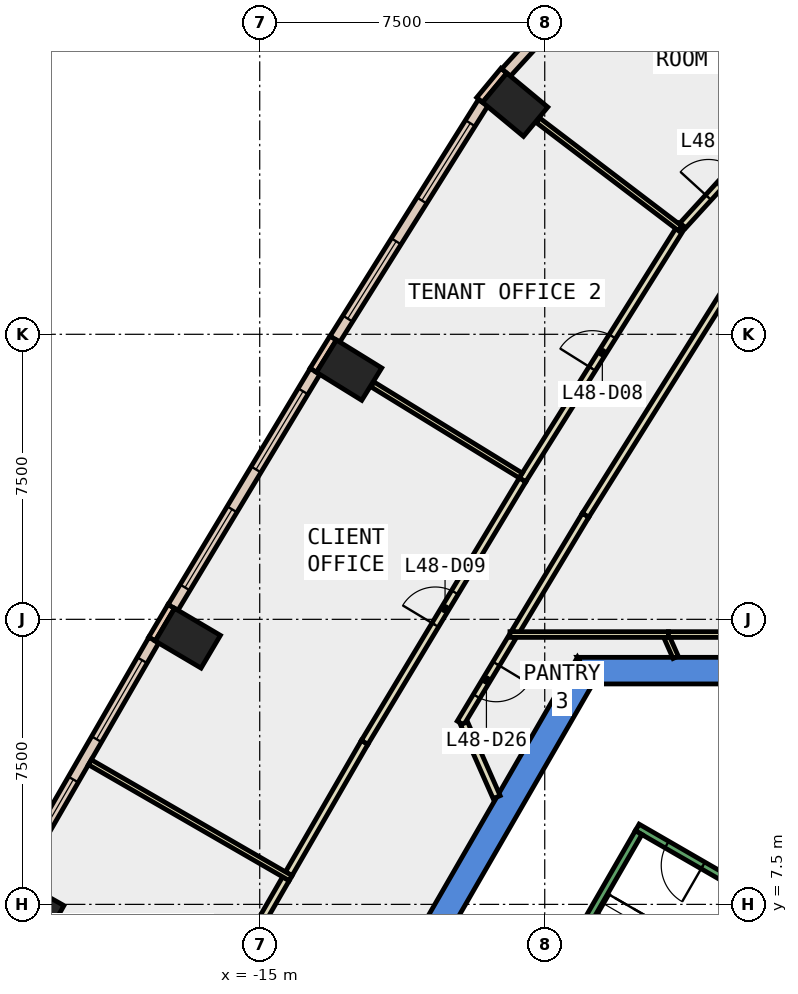
"""IFC4 building model, lengths in metres.
Left out: names, types, materials, properties, quantities, classifications, styles, units other than length and angle.
Written with IfcOpenShell. Run it as: python <this file> out.ifc"""

import sys

from ifc_helpers import new_model, si_unit, direction, frame, frame_2d, origin, origin_2d, place, context, subcontext, project, spatial, polyline, rectangle, outline, extrude, element, fill, save


model = new_model("IFC4")
c1 = context("Model", 3, precision=1e-05, world=origin(), true_north=direction((0.0, 1.0)))
c2 = subcontext(c1, "Body", "Model", "MODEL_VIEW")
j1 = project(units=[si_unit("LENGTHUNIT", "METRE"), si_unit("PLANEANGLEUNIT", "RADIAN")], contexts=[c1])
p1 = place(None, origin())
s1 = spatial("IfcSite", under=j1, at=p1, CompositionType="ELEMENT")
p2 = place(p1, origin())
s2 = spatial("IfcBuilding", under=s1, at=p2, CompositionType="ELEMENT")
p3 = place(p2, frame((0.0, 0.0, 215.0)))
s3 = spatial("IfcBuildingStorey", under=s2, at=p3, CompositionType="ELEMENT", Elevation=215.0)
for number, where, z_axis, x_axis in (
    (1, (-8.278, 28.54, -0.4), (0.0, 0.0, 1.0), (0.639, 0.769, 0.0)),
    (2, (-12.648, 21.557, -0.4), (0.0, 0.0, 1.0), (0.525, 0.851, 0.0)),
    (3, (-16.892, 14.504, -0.4), (0.0, 0.0, 1.0), (0.509, 0.861, 0.0)),
    (4, (-21.007, 7.377, -0.4), (0.0, 0.0, 1.0), (0.491, 0.871, 0.0)),
):
    element("IfcColumn", number, at=place(p3, frame(where, z_axis=z_axis, x_axis=x_axis)), inside=s3, PredefinedType="COLUMN", context=c2, shape_type="SweptSolid", body=[
        extrude(rectangle(XDim=1.0, YDim=1.4, at=origin_2d()), origin(), (0.0, 0.0, 1.0), 4.2),
    ])
p4 = place(p3, frame((0.0, 0.0, -0.4)))
e5 = element("IfcWall", 5, at=p4, inside=s3, PredefinedType="SHEAR", context=c2, shape_type="SweptSolid", body=[
    extrude(outline(polyline([(6.64, 14.0), (-6.64, 14.0), (-6.235, 13.3), (6.235, 13.3), (6.64, 14.0)])), origin(), (0.0, 0.0, 1.0), 4.2),
])
p5 = place(p3, frame((0.0, 0.0, -0.4)))
e6 = element("IfcWall", 6, at=p5, inside=s3, PredefinedType="SHEAR", context=c2, shape_type="SweptSolid", body=[
    extrude(outline(polyline([(-11.834, 5.002), (-11.228, 4.652), (-6.235, 13.3), (-6.64, 14.0), (-11.834, 5.002)])), origin(), (0.0, 0.0, 1.0), 4.2),
])
p6 = place(p3, frame((-8.575, 29.436, 0.0), z_axis=(0.0, 0.0, 1.0), x_axis=(-0.637972365578, -0.770059257953, 0.0)))
e7 = element("IfcWall", 7, at=p6, inside=s3, PredefinedType="STANDARD", context=c2, shape_type="SweptSolid", body=[
    extrude(rectangle(XDim=1.0, YDim=0.2, at=frame_2d((0.5, 0.0))), origin(), (0.0, 0.0, 1.0), 3.8),
])
p7 = place(p3, frame((-13.066, 22.403, 0.0), z_axis=(0.0, 0.0, 1.0), x_axis=(-0.525825307325, -0.850592585306, 0.0)))
e8 = element("IfcWall", 8, at=p7, inside=s3, PredefinedType="STANDARD", context=c2, shape_type="SweptSolid", body=[
    extrude(rectangle(XDim=1.0, YDim=0.2, at=frame_2d((0.5, 0.0))), origin(), (0.0, 0.0, 1.0), 3.8),
])
p8 = place(p3, frame((-17.327, 15.342, 0.0), z_axis=(0.0, 0.0, 1.0), x_axis=(-0.508161541526, -0.861261776531, 0.0)))
e9 = element("IfcWall", 9, at=p8, inside=s3, PredefinedType="STANDARD", context=c2, shape_type="SweptSolid", body=[
    extrude(rectangle(XDim=1.0, YDim=0.2, at=frame_2d((0.5, 0.0))), origin(), (0.0, 0.0, 1.0), 3.8),
])
p9 = place(p3, frame((-5.653, 32.524, 0.0), z_axis=(0.0, 0.0, 1.0), x_axis=(-0.674487390017, -0.738286367684, 0.0)))
e10 = element("IfcWall", 10, at=p9, inside=s3, PredefinedType="STANDARD", context=c2, shape_type="SweptSolid", body=[
    extrude(rectangle(XDim=4.248, YDim=0.3, at=frame_2d((2.124, 0.0))), origin(), (0.0, 0.0, 1.0), 3.8),
])
p10 = place(p9, frame((1.424, 0.0, 0.9)))
e11 = element("IfcOpeningElement", 11, at=p10, cuts=e10, PredefinedType="OPENING", context=c2, shape_type="SweptSolid", body=[
    extrude(rectangle(XDim=1.4, YDim=2.6, at=frame_2d((0.7, 1.3))), frame((0.0, 0.16, 0.0), z_axis=(0.0, -1.0, 0.0), x_axis=(1.0, 0.0, 0.0)), (0.0, 0.0, 1.0), 0.32),
])
p11 = place(p3, frame((-9.122, 28.592, 0.0), z_axis=(0.0, 0.0, 1.0), x_axis=(-0.531239262679, -0.847221839773, 0.0)))
e12 = element("IfcWall", 12, at=p11, inside=s3, PredefinedType="STANDARD", context=c2, shape_type="SweptSolid", body=[
    extrude(rectangle(XDim=7.339, YDim=0.3, at=frame_2d((3.67, 0.0))), origin(), (0.0, 0.0, 1.0), 3.8),
])
p12 = place(p11, frame((0.635, 0.0, 0.9)))
e13 = element("IfcOpeningElement", 13, at=p12, cuts=e12, PredefinedType="OPENING", context=c2, shape_type="SweptSolid", body=[
    extrude(rectangle(XDim=2.4, YDim=2.6, at=frame_2d((1.2, 1.3))), frame((0.0, 0.16, 0.0), z_axis=(0.0, -1.0, 0.0), x_axis=(1.0, 0.0, 0.0)), (0.0, 0.0, 1.0), 0.32),
])
p13 = place(p11, frame((4.304, 0.0, 0.9)))
e14 = element("IfcOpeningElement", 14, at=p13, cuts=e12, PredefinedType="OPENING", context=c2, shape_type="SweptSolid", body=[
    extrude(rectangle(XDim=2.4, YDim=2.6, at=frame_2d((1.2, 1.3))), frame((0.0, 0.16, 0.0), z_axis=(0.0, -1.0, 0.0), x_axis=(1.0, 0.0, 0.0)), (0.0, 0.0, 1.0), 0.32),
])
p14 = place(p3, frame((-13.544, 21.524, 0.0), z_axis=(0.0, 0.0, 1.0), x_axis=(-0.515560283412, -0.856853309597, 0.0)))
e15 = element("IfcWall", 15, at=p14, inside=s3, PredefinedType="STANDARD", context=c2, shape_type="SweptSolid", body=[
    extrude(rectangle(XDim=7.249, YDim=0.3, at=frame_2d((3.624, 0.0))), origin(), (0.0, 0.0, 1.0), 3.8),
])
p15 = place(p14, frame((0.612, 0.0, 0.9)))
e16 = element("IfcOpeningElement", 16, at=p15, cuts=e15, PredefinedType="OPENING", context=c2, shape_type="SweptSolid", body=[
    extrude(rectangle(XDim=2.4, YDim=2.6, at=frame_2d((1.2, 1.3))), frame((0.0, 0.16, 0.0), z_axis=(0.0, -1.0, 0.0), x_axis=(1.0, 0.0, 0.0)), (0.0, 0.0, 1.0), 0.32),
])
p16 = place(p14, frame((4.236, 0.0, 0.9)))
e17 = element("IfcOpeningElement", 17, at=p16, cuts=e15, PredefinedType="OPENING", context=c2, shape_type="SweptSolid", body=[
    extrude(rectangle(XDim=2.4, YDim=2.6, at=frame_2d((1.2, 1.3))), frame((0.0, 0.16, 0.0), z_axis=(0.0, -1.0, 0.0), x_axis=(1.0, 0.0, 0.0)), (0.0, 0.0, 1.0), 0.32),
])
p17 = place(p3, frame((-17.787, 14.454, 0.0), z_axis=(0.0, 0.0, 1.0), x_axis=(-0.499968351115, -0.866043675505, 0.0)))
e18 = element("IfcWall", 18, at=p17, inside=s3, PredefinedType="STANDARD", context=c2, shape_type="SweptSolid", body=[
    extrude(rectangle(XDim=7.248, YDim=0.3, at=frame_2d((3.624, 0.0))), origin(), (0.0, 0.0, 1.0), 3.8),
])
p18 = place(p17, frame((0.612, 0.0, 0.9)))
e19 = element("IfcOpeningElement", 19, at=p18, cuts=e18, PredefinedType="OPENING", context=c2, shape_type="SweptSolid", body=[
    extrude(rectangle(XDim=2.4, YDim=2.6, at=frame_2d((1.2, 1.3))), frame((0.0, 0.16, 0.0), z_axis=(0.0, -1.0, 0.0), x_axis=(1.0, 0.0, 0.0)), (0.0, 0.0, 1.0), 0.32),
])
p19 = place(p17, frame((4.236, 0.0, 0.9)))
e20 = element("IfcOpeningElement", 20, at=p19, cuts=e18, PredefinedType="OPENING", context=c2, shape_type="SweptSolid", body=[
    extrude(rectangle(XDim=2.4, YDim=2.6, at=frame_2d((1.2, 1.3))), frame((0.0, 0.16, 0.0), z_axis=(0.0, -1.0, 0.0), x_axis=(1.0, 0.0, 0.0)), (0.0, 0.0, 1.0), 0.32),
])
p20 = place(p3, frame((-8.353, 14.536, 0.0), z_axis=(0.0, 0.0, 1.0), x_axis=(-0.515636196259, -0.856807628997, 0.0)))
e21 = element("IfcWall", 21, at=p20, inside=s3, PredefinedType="PARTITIONING", context=c2, shape_type="SweptSolid", body=[
    extrude(rectangle(XDim=2.643, YDim=0.2, at=frame_2d((1.322, 0.0))), origin(), (0.0, 0.0, 1.0), 3.8),
])
p21 = place(p20, frame((0.822, 0.0, 0.0)))
e22 = element("IfcOpeningElement", 22, at=p21, cuts=e21, PredefinedType="OPENING", context=c2, shape_type="SweptSolid", body=[
    extrude(rectangle(XDim=1.0, YDim=2.1, at=frame_2d((0.5, 1.05))), frame((0.0, 0.11, 0.0), z_axis=(0.0, -1.0, 0.0), x_axis=(1.0, 0.0, 0.0)), (0.0, 0.0, 1.0), 0.22),
])
p22 = place(p3, frame((-9.624, 12.265, 0.0), z_axis=(0.0, 0.0, 1.0), x_axis=(0.404081180606, -0.914723127225, 0.0)))
e23 = element("IfcWall", 23, at=p22, inside=s3, PredefinedType="PARTITIONING", context=c2, shape_type="SweptSolid", body=[
    extrude(rectangle(XDim=2.126, YDim=0.2, at=frame_2d((1.063, 0.0))), origin(), (0.0, 0.0, 1.0), 3.8),
])
p23 = place(p3, frame((-2.364, 24.216, 0.0), z_axis=(0.0, 0.0, 1.0), x_axis=(-0.531335643981, -0.847161397512, 0.0)))
e24 = element("IfcWall", 24, at=p23, inside=s3, PredefinedType="PARTITIONING", context=c2, shape_type="SweptSolid", body=[
    extrude(rectangle(XDim=7.647, YDim=0.2, at=frame_2d((3.823, 0.0))), origin(), (0.0, 0.0, 1.0), 3.8),
])
p24 = place(p3, frame((-6.427, 17.738, 0.0), z_axis=(0.0, 0.0, 1.0), x_axis=(-0.515416266777, -0.85693994652, 0.0)))
e25 = element("IfcWall", 25, at=p24, inside=s3, PredefinedType="PARTITIONING", context=c2, shape_type="SweptSolid", body=[
    extrude(rectangle(XDim=3.587, YDim=0.2, at=frame_2d((1.793, 0.0))), origin(), (0.0, 0.0, 1.0), 3.8),
])
p25 = place(p3, frame((-3.869, 25.36, 0.0), z_axis=(0.0, 0.0, 1.0), x_axis=(0.674594755709, 0.738188265668, 0.0)))
e26 = element("IfcWall", 26, at=p25, inside=s3, PredefinedType="PARTITIONING", context=c2, shape_type="SweptSolid", body=[
    extrude(rectangle(XDim=3.006, YDim=0.2, at=frame_2d((1.503, 0.0))), origin(), (0.0, 0.0, 1.0), 3.8),
])
p26 = place(p25, frame((1.003, 0.0, 0.0)))
e27 = element("IfcOpeningElement", 27, at=p26, cuts=e26, PredefinedType="OPENING", context=c2, shape_type="SweptSolid", body=[
    extrude(rectangle(XDim=1.0, YDim=2.1, at=frame_2d((0.5, 1.05))), frame((0.0, 0.11, 0.0), z_axis=(0.0, -1.0, 0.0), x_axis=(1.0, 0.0, 0.0)), (0.0, 0.0, 1.0), 0.22),
])
p27 = place(p3, frame((-8.086, 18.669, 0.0), z_axis=(0.0, 0.0, 1.0), x_axis=(0.531329962263, 0.847164961033, 0.0)))
e28 = element("IfcWall", 28, at=p27, inside=s3, PredefinedType="PARTITIONING", context=c2, shape_type="SweptSolid", body=[
    extrude(rectangle(XDim=7.91, YDim=0.2, at=frame_2d((3.955, 0.0))), origin(), (0.0, 0.0, 1.0), 3.8),
])
p28 = place(p27, frame((3.455, 0.0, 0.0)))
e29 = element("IfcOpeningElement", 29, at=p28, cuts=e28, PredefinedType="OPENING", context=c2, shape_type="SweptSolid", body=[
    extrude(rectangle(XDim=1.0, YDim=2.1, at=frame_2d((0.5, 1.05))), frame((0.0, 0.11, 0.0), z_axis=(0.0, -1.0, 0.0), x_axis=(1.0, 0.0, 0.0)), (0.0, 0.0, 1.0), 0.22),
])
p29 = place(p3, frame((-14.236, 8.305, 0.0), z_axis=(0.0, 0.0, 1.0), x_axis=(0.500110539333, 0.865961574464, 0.0)))
e30 = element("IfcWall", 30, at=p29, inside=s3, PredefinedType="PARTITIONING", context=c2, shape_type="SweptSolid", body=[
    extrude(rectangle(XDim=3.993, YDim=0.2, at=frame_2d((1.997, 0.0))), origin(), (0.0, 0.0, 1.0), 3.8),
])
p30 = place(p3, frame((-12.239, 11.763, 0.0), z_axis=(0.0, 0.0, 1.0), x_axis=(0.515591302858, 0.856834644734, 0.0)))
e31 = element("IfcWall", 31, at=p30, inside=s3, PredefinedType="PARTITIONING", context=c2, shape_type="SweptSolid", body=[
    extrude(rectangle(XDim=8.059, YDim=0.2, at=frame_2d((4.029, 0.0))), origin(), (0.0, 0.0, 1.0), 3.8),
])
p31 = place(p30, frame((3.604, 0.0, 0.0)))
e32 = element("IfcOpeningElement", 32, at=p31, cuts=e31, PredefinedType="OPENING", context=c2, shape_type="SweptSolid", body=[
    extrude(rectangle(XDim=1.0, YDim=2.1, at=frame_2d((0.5, 1.05))), frame((0.0, 0.11, 0.0), z_axis=(0.0, -1.0, 0.0), x_axis=(1.0, 0.0, 0.0)), (0.0, 0.0, 1.0), 0.22),
])
p32 = place(p3, frame((-16.306, 4.718, 0.0), z_axis=(0.0, 0.0, 1.0), x_axis=(0.499803646539, 0.866138738832, 0.0)))
e33 = element("IfcWall", 33, at=p32, inside=s3, PredefinedType="PARTITIONING", context=c2, shape_type="SweptSolid", body=[
    extrude(rectangle(XDim=3.991, YDim=0.2, at=frame_2d((1.996, 0.0))), origin(), (0.0, 0.0, 1.0), 3.8),
])
p33 = place(p3, frame((-4.055, 14.0, 0.0), z_axis=(0.0, 0.0, 1.0), x_axis=(-0.404850841056, 0.914382740703, 0.0)))
e34 = element("IfcWall", 34, at=p33, inside=s3, PredefinedType="PARTITIONING", context=c2, shape_type="SweptSolid", body=[
    extrude(rectangle(XDim=0.581, YDim=0.15, at=frame_2d((0.291, 0.0))), origin(), (0.0, 0.0, 1.0), 3.8),
])
p34 = place(p3, frame((-4.245, 14.6, 0.0), z_axis=(0.0, 0.0, 1.0), x_axis=(-1.0, 0.0, 0.0)))
e35 = element("IfcWall", 35, at=p34, inside=s3, PredefinedType="PARTITIONING", context=c2, shape_type="SweptSolid", body=[
    extrude(rectangle(XDim=4.17, YDim=0.15, at=frame_2d((2.085, 0.0))), origin(), (0.0, 0.0, 1.0), 3.8),
])
p35 = place(p3, frame((-3.936, 25.286, 0.0), z_axis=(0.0, 0.0, 1.0), x_axis=(-0.795977117067, 0.605326712698, 0.0)))
e36 = element("IfcWall", 36, at=p35, inside=s3, PredefinedType="PARTITIONING", context=c2, shape_type="SweptSolid", body=[
    extrude(rectangle(XDim=4.704, YDim=0.15, at=frame_2d((2.352, 0.0))), origin(), (0.0, 0.0, 1.0), 3.8),
])
p36 = place(p3, frame((-8.131, 18.784, 0.0), z_axis=(0.0, 0.0, 1.0), x_axis=(-0.851969320918, 0.52359170755, 0.0)))
e37 = element("IfcWall", 37, at=p36, inside=s3, PredefinedType="PARTITIONING", context=c2, shape_type="SweptSolid", body=[
    extrude(rectangle(XDim=4.58, YDim=0.15, at=frame_2d((2.29, 0.0))), origin(), (0.0, 0.0, 1.0), 3.8),
])
p37 = place(p3, frame((-14.187, 8.19, 0.0), z_axis=(0.0, 0.0, 1.0), x_axis=(-0.865990270311, 0.500060848024, 0.0)))
e38 = element("IfcWall", 38, at=p37, inside=s3, PredefinedType="PARTITIONING", context=c2, shape_type="SweptSolid", body=[
    extrude(rectangle(XDim=6.099, YDim=0.15, at=frame_2d((3.05, 0.0))), origin(), (0.0, 0.0, 1.0), 3.8),
])
p38 = place(p3, frame((-0.4, 14.6, 0.0), z_axis=(0.0, 0.0, 1.0), x_axis=(-1.0, 0.0, 0.0)))
e39 = element("IfcWall", 39, at=p38, inside=s3, PredefinedType="PARTITIONING", context=c2, shape_type="SweptSolid", body=[
    extrude(rectangle(XDim=3.845, YDim=0.15, at=frame_2d((1.923, 0.0))), origin(), (0.0, 0.0, 1.0), 3.8),
])
p39 = place(p3, frame((-1.256, 7.324, 0.0), z_axis=(0.0, 0.0, 1.0), x_axis=(-0.866046073146, 0.499964197906, 0.0)))
e40 = element("IfcWall", 40, at=p39, inside=s3, PredefinedType="STANDARD", context=c2, shape_type="SweptSolid", body=[
    extrude(rectangle(XDim=4.4, YDim=0.2, at=frame_2d((2.2, 0.0))), origin(), (0.0, 0.0, 1.0), 3.8),
])
p40 = place(p39, frame((2.4, 0.0, 0.0)))
e41 = element("IfcOpeningElement", 41, at=p40, cuts=e40, PredefinedType="OPENING", context=c2, shape_type="SweptSolid", body=[
    extrude(rectangle(XDim=1.1, YDim=2.2, at=frame_2d((0.55, 1.1))), frame((0.0, 0.11, 0.0), z_axis=(0.0, -1.0, 0.0), x_axis=(1.0, 0.0, 0.0)), (0.0, 0.0, 1.0), 0.22),
])
p41 = place(p3, frame((-1.393, 7.288, 0.0), z_axis=(0.0, 0.0, 1.0), x_axis=(-0.499963383562, -0.866046543262, 0.0)))
e42 = element("IfcWall", 42, at=p41, inside=s3, PredefinedType="STANDARD", context=c2, shape_type="SweptSolid", body=[
    extrude(rectangle(XDim=6.9, YDim=0.2, at=frame_2d((3.45, 0.0))), origin(), (0.0, 0.0, 1.0), 3.8),
])
p42 = place(p41, frame((0.45, 0.0, 0.0)))
e43 = element("IfcOpeningElement", 43, at=p42, cuts=e42, PredefinedType="OPENING", context=c2, shape_type="SweptSolid", body=[
    extrude(rectangle(XDim=1.1, YDim=2.2, at=frame_2d((0.55, 1.1))), frame((0.0, 0.11, 0.0), z_axis=(0.0, -1.0, 0.0), x_axis=(1.0, 0.0, 0.0)), (0.0, 0.0, 1.0), 0.22),
])
p43 = place(p3, frame((-5.03, 9.388, 0.0), z_axis=(0.0, 0.0, 1.0), x_axis=(-0.499978703459, -0.866037698999, 0.0)))
e44 = element("IfcWall", 44, at=p43, inside=s3, PredefinedType="STANDARD", context=c2, shape_type="SweptSolid", body=[
    extrude(rectangle(XDim=6.9, YDim=0.2, at=frame_2d((3.45, 0.0))), origin(), (0.0, 0.0, 1.0), 3.8),
])
p44 = place(p12, origin())
e45 = element("IfcWindow", 45, at=p44, inside=s3, PartitioningType="SINGLE_PANEL", PredefinedType="WINDOW", context=c2, shape_type="SweptSolid", body=[
    extrude(rectangle(XDim=2.4, YDim=2.6, at=frame_2d((1.2, 1.3))), frame((0.0, 0.03, 0.0), z_axis=(0.0, -1.0, 0.0), x_axis=(1.0, 0.0, 0.0)), (0.0, 0.0, 1.0), 0.06),
])
fill(e13, e45)
p45 = place(p13, origin())
e46 = element("IfcWindow", 46, at=p45, inside=s3, PartitioningType="SINGLE_PANEL", PredefinedType="WINDOW", context=c2, shape_type="SweptSolid", body=[
    extrude(rectangle(XDim=2.4, YDim=2.6, at=frame_2d((1.2, 1.3))), frame((0.0, 0.03, 0.0), z_axis=(0.0, -1.0, 0.0), x_axis=(1.0, 0.0, 0.0)), (0.0, 0.0, 1.0), 0.06),
])
fill(e14, e46)
p46 = place(p15, origin())
e47 = element("IfcWindow", 47, at=p46, inside=s3, PartitioningType="SINGLE_PANEL", PredefinedType="WINDOW", context=c2, shape_type="SweptSolid", body=[
    extrude(rectangle(XDim=2.4, YDim=2.6, at=frame_2d((1.2, 1.3))), frame((0.0, 0.03, 0.0), z_axis=(0.0, -1.0, 0.0), x_axis=(1.0, 0.0, 0.0)), (0.0, 0.0, 1.0), 0.06),
])
fill(e16, e47)
p47 = place(p16, origin())
e48 = element("IfcWindow", 48, at=p47, inside=s3, PartitioningType="SINGLE_PANEL", PredefinedType="WINDOW", context=c2, shape_type="SweptSolid", body=[
    extrude(rectangle(XDim=2.4, YDim=2.6, at=frame_2d((1.2, 1.3))), frame((0.0, 0.03, 0.0), z_axis=(0.0, -1.0, 0.0), x_axis=(1.0, 0.0, 0.0)), (0.0, 0.0, 1.0), 0.06),
])
fill(e17, e48)
p48 = place(p18, origin())
e49 = element("IfcWindow", 49, at=p48, inside=s3, PartitioningType="SINGLE_PANEL", PredefinedType="WINDOW", context=c2, shape_type="SweptSolid", body=[
    extrude(rectangle(XDim=2.4, YDim=2.6, at=frame_2d((1.2, 1.3))), frame((0.0, 0.03, 0.0), z_axis=(0.0, -1.0, 0.0), x_axis=(1.0, 0.0, 0.0)), (0.0, 0.0, 1.0), 0.06),
])
fill(e19, e49)
p49 = place(p19, origin())
e50 = element("IfcWindow", 50, at=p49, inside=s3, PartitioningType="SINGLE_PANEL", PredefinedType="WINDOW", context=c2, shape_type="SweptSolid", body=[
    extrude(rectangle(XDim=2.4, YDim=2.6, at=frame_2d((1.2, 1.3))), frame((0.0, 0.03, 0.0), z_axis=(0.0, -1.0, 0.0), x_axis=(1.0, 0.0, 0.0)), (0.0, 0.0, 1.0), 0.06),
])
fill(e20, e50)
p50 = place(p26, origin())
e51 = element("IfcDoor", 51, at=p50, inside=s3, OperationType="SINGLE_SWING_LEFT", PredefinedType="DOOR", context=c2, shape_type="SweptSolid", body=[
    extrude(rectangle(XDim=1.0, YDim=2.1, at=frame_2d((0.5, 1.05))), frame((0.0, 0.025, 0.0), z_axis=(0.0, -1.0, 0.0), x_axis=(1.0, 0.0, 0.0)), (0.0, 0.0, 1.0), 0.05),
])
fill(e27, e51)
p51 = place(p28, origin())
e52 = element("IfcDoor", 52, at=p51, inside=s3, OperationType="SINGLE_SWING_RIGHT", PredefinedType="DOOR", context=c2, shape_type="SweptSolid", body=[
    extrude(rectangle(XDim=1.0, YDim=2.1, at=frame_2d((0.5, 1.05))), frame((0.0, 0.025, 0.0), z_axis=(0.0, -1.0, 0.0), x_axis=(1.0, 0.0, 0.0)), (0.0, 0.0, 1.0), 0.05),
])
fill(e29, e52)
p52 = place(p31, origin())
e53 = element("IfcDoor", 53, at=p52, inside=s3, OperationType="SINGLE_SWING_RIGHT", PredefinedType="DOOR", context=c2, shape_type="SweptSolid", body=[
    extrude(rectangle(XDim=1.0, YDim=2.1, at=frame_2d((0.5, 1.05))), frame((0.0, 0.025, 0.0), z_axis=(0.0, -1.0, 0.0), x_axis=(1.0, 0.0, 0.0)), (0.0, 0.0, 1.0), 0.05),
])
fill(e32, e53)
p53 = place(p21, origin())
e54 = element("IfcDoor", 54, at=p53, inside=s3, OperationType="SINGLE_SWING_LEFT", PredefinedType="DOOR", context=c2, shape_type="SweptSolid", body=[
    extrude(rectangle(XDim=1.0, YDim=2.1, at=frame_2d((0.5, 1.05))), frame((0.0, 0.025, 0.0), z_axis=(0.0, -1.0, 0.0), x_axis=(1.0, 0.0, 0.0)), (0.0, 0.0, 1.0), 0.05),
])
fill(e22, e54)
p54 = place(p40, origin())
e55 = element("IfcDoor", 55, at=p54, inside=s3, OperationType="SINGLE_SWING_LEFT", PredefinedType="DOOR", context=c2, shape_type="SweptSolid", body=[
    extrude(rectangle(XDim=1.1, YDim=2.2, at=frame_2d((0.55, 1.1))), frame((0.0, 0.025, 0.0), z_axis=(0.0, -1.0, 0.0), x_axis=(1.0, 0.0, 0.0)), (0.0, 0.0, 1.0), 0.05),
])
fill(e41, e55)
save(model, sys.argv[1])
